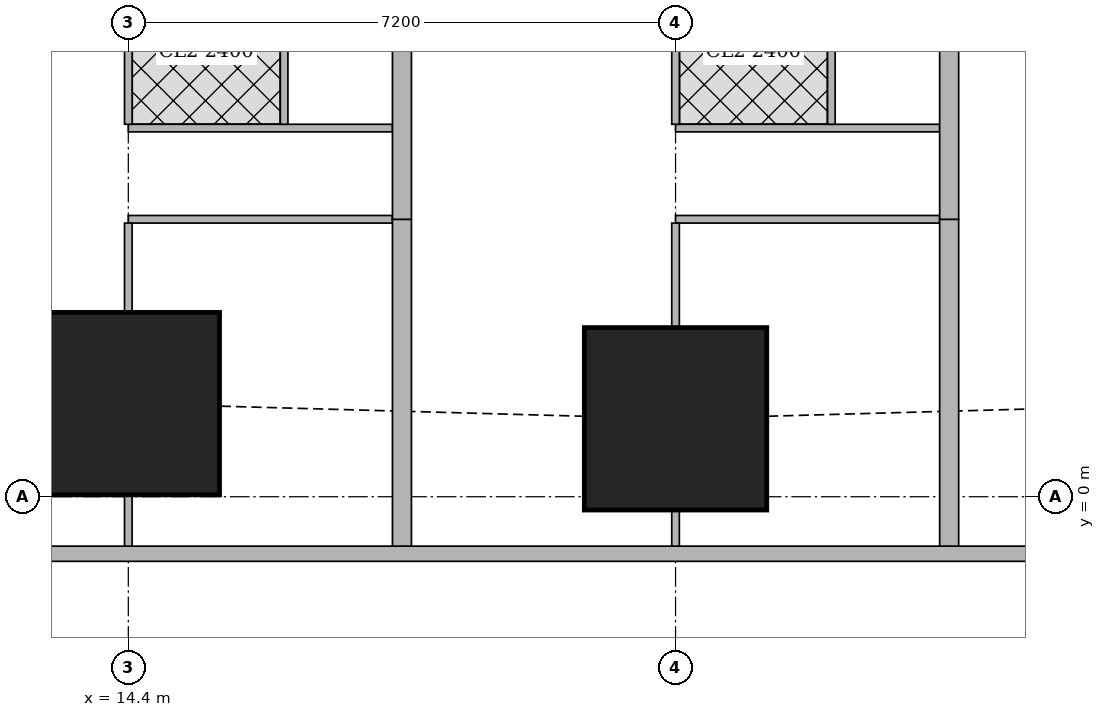
"""IFC4 building model, lengths in metres.
Left out: names, types, materials, properties, quantities, classifications, styles, units other than length and angle.
Written with IfcOpenShell. Run it as: python <this file> out.ifc"""

import sys

from ifc_helpers import new_model, si_unit, direction, frame, frame_2d, origin, origin_2d, place, context, subcontext, project, spatial, rectangle, extrude, element, fill, save


model = new_model("IFC4")
c1 = context("Model", 3, precision=1e-05, world=origin(), true_north=direction((0.0, 1.0)))
c2 = subcontext(c1, "Body", "Model", "MODEL_VIEW")
j1 = project(units=[si_unit("LENGTHUNIT", "METRE"), si_unit("PLANEANGLEUNIT", "RADIAN")], contexts=[c1])
p1 = place(None, origin())
s1 = spatial("IfcSite", under=j1, at=p1, CompositionType="ELEMENT")
p2 = place(p1, origin())
s2 = spatial("IfcBuilding", under=s1, at=p2, CompositionType="ELEMENT")
p3 = place(p2, frame((0.0, 0.0, 204.95)))
s3 = spatial("IfcBuildingStorey", under=s2, at=p3, CompositionType="ELEMENT", Elevation=204.95)
for number, where, z_axis, x_axis in (
    (1, (14.4, 1.225, 0.0), (0.0, 0.0, 1.0), (1.0, 0.0, 0.0)),
    (2, (21.6, 1.025, 0.0), (0.0, 0.0, 1.0), (1.0, 0.0, 0.0)),
):
    element("IfcColumn", number, at=place(p3, frame(where, z_axis=z_axis, x_axis=x_axis)), inside=s3, PredefinedType="COLUMN", context=c2, shape_type="SweptSolid", body=[
        extrude(rectangle(XDim=2.4, YDim=2.4, at=origin_2d()), origin(), (0.0, 0.0, 1.0), 3.75),
    ])
p4 = place(p3, frame((7.363, -0.75, 0.0), z_axis=(0.0, 0.0, 1.0), x_axis=(1.0, 0.0, 0.0)))
e3 = element("IfcWall", 3, at=p4, inside=s3, PredefinedType="SOLIDWALL", context=c2, shape_type="SweptSolid", body=[
    extrude(rectangle(XDim=40.428, YDim=0.2, at=frame_2d((20.214, 0.0))), origin(), (0.0, 0.0, 1.0), 3.5),
])
p5 = place(p4, frame((2.319, 0.0, 0.9)))
e4 = element("IfcOpeningElement", 4, at=p5, cuts=e3, PredefinedType="OPENING", context=c2, shape_type="SweptSolid", body=[
    extrude(rectangle(XDim=2.4, YDim=1.5, at=frame_2d((1.2, 0.75))), frame((0.0, 0.11, 0.0), z_axis=(0.0, -1.0, 0.0), x_axis=(1.0, 0.0, 0.0)), (0.0, 0.0, 1.0), 0.22),
])
p6 = place(p4, frame((7.937, 0.0, 0.9)))
e5 = element("IfcOpeningElement", 5, at=p6, cuts=e3, PredefinedType="OPENING", context=c2, shape_type="SweptSolid", body=[
    extrude(rectangle(XDim=1.8, YDim=1.5, at=frame_2d((0.9, 0.75))), frame((0.0, 0.11, 0.0), z_axis=(0.0, -1.0, 0.0), x_axis=(1.0, 0.0, 0.0)), (0.0, 0.0, 1.0), 0.22),
])
p7 = place(p4, frame((11.537, 0.0, 0.9)))
e6 = element("IfcOpeningElement", 6, at=p7, cuts=e3, PredefinedType="OPENING", context=c2, shape_type="SweptSolid", body=[
    extrude(rectangle(XDim=1.8, YDim=1.5, at=frame_2d((0.9, 0.75))), frame((0.0, 0.11, 0.0), z_axis=(0.0, -1.0, 0.0), x_axis=(1.0, 0.0, 0.0)), (0.0, 0.0, 1.0), 0.22),
])
p8 = place(p4, frame((15.137, 0.0, 0.9)))
e7 = element("IfcOpeningElement", 7, at=p8, cuts=e3, PredefinedType="OPENING", context=c2, shape_type="SweptSolid", body=[
    extrude(rectangle(XDim=1.8, YDim=1.5, at=frame_2d((0.9, 0.75))), frame((0.0, 0.11, 0.0), z_axis=(0.0, -1.0, 0.0), x_axis=(1.0, 0.0, 0.0)), (0.0, 0.0, 1.0), 0.22),
])
p9 = place(p4, frame((18.737, 0.0, 0.9)))
e8 = element("IfcOpeningElement", 8, at=p9, cuts=e3, PredefinedType="OPENING", context=c2, shape_type="SweptSolid", body=[
    extrude(rectangle(XDim=1.8, YDim=1.5, at=frame_2d((0.9, 0.75))), frame((0.0, 0.11, 0.0), z_axis=(0.0, -1.0, 0.0), x_axis=(1.0, 0.0, 0.0)), (0.0, 0.0, 1.0), 0.22),
])
p10 = place(p4, frame((22.337, 0.0, 0.9)))
e9 = element("IfcOpeningElement", 9, at=p10, cuts=e3, PredefinedType="OPENING", context=c2, shape_type="SweptSolid", body=[
    extrude(rectangle(XDim=1.8, YDim=1.5, at=frame_2d((0.9, 0.75))), frame((0.0, 0.11, 0.0), z_axis=(0.0, -1.0, 0.0), x_axis=(1.0, 0.0, 0.0)), (0.0, 0.0, 1.0), 0.22),
])
p11 = place(p4, frame((25.937, 0.0, 0.9)))
e10 = element("IfcOpeningElement", 10, at=p11, cuts=e3, PredefinedType="OPENING", context=c2, shape_type="SweptSolid", body=[
    extrude(rectangle(XDim=1.8, YDim=1.5, at=frame_2d((0.9, 0.75))), frame((0.0, 0.11, 0.0), z_axis=(0.0, -1.0, 0.0), x_axis=(1.0, 0.0, 0.0)), (0.0, 0.0, 1.0), 0.22),
])
p12 = place(p4, frame((29.537, 0.0, 0.9)))
e11 = element("IfcOpeningElement", 11, at=p12, cuts=e3, PredefinedType="OPENING", context=c2, shape_type="SweptSolid", body=[
    extrude(rectangle(XDim=1.8, YDim=1.5, at=frame_2d((0.9, 0.75))), frame((0.0, 0.11, 0.0), z_axis=(0.0, -1.0, 0.0), x_axis=(1.0, 0.0, 0.0)), (0.0, 0.0, 1.0), 0.22),
])
p13 = place(p3, frame((17.875, 3.65, 0.0), z_axis=(0.0, 0.0, 1.0), x_axis=(-1.0, 0.0, 0.0)))
e12 = element("IfcWall", 12, at=p13, inside=s3, PredefinedType="PARTITIONING", context=c2, shape_type="SweptSolid", body=[
    extrude(rectangle(XDim=3.475, YDim=0.1, at=frame_2d((1.738, 0.0))), origin(), (0.0, 0.0, 1.0), 3.5),
])
p14 = place(p13, frame((1.35, 0.0, 0.0)))
e13 = element("IfcOpeningElement", 13, at=p14, cuts=e12, PredefinedType="OPENING", context=c2, shape_type="SweptSolid", body=[
    extrude(rectangle(XDim=0.9, YDim=2.1, at=frame_2d((0.45, 1.05))), frame((0.0, 0.06, 0.0), z_axis=(0.0, -1.0, 0.0), x_axis=(1.0, 0.0, 0.0)), (0.0, 0.0, 1.0), 0.12),
])
p15 = place(p3, frame((17.875, 4.85, 0.0), z_axis=(0.0, 0.0, 1.0), x_axis=(-1.0, 0.0, 0.0)))
e14 = element("IfcWall", 14, at=p15, inside=s3, PredefinedType="PARTITIONING", context=c2, shape_type="SweptSolid", body=[
    extrude(rectangle(XDim=3.475, YDim=0.1, at=frame_2d((1.738, 0.0))), origin(), (0.0, 0.0, 1.0), 3.5),
])
p16 = place(p15, frame((2.0, 0.0, 0.0)))
e15 = element("IfcOpeningElement", 15, at=p16, cuts=e14, PredefinedType="OPENING", context=c2, shape_type="SweptSolid", body=[
    extrude(rectangle(XDim=0.9, YDim=2.1, at=frame_2d((0.45, 1.05))), frame((0.0, 0.06, 0.0), z_axis=(0.0, -1.0, 0.0), x_axis=(1.0, 0.0, 0.0)), (0.0, 0.0, 1.0), 0.12),
])
p17 = place(p15, frame((0.2, 0.0, 0.0)))
e16 = element("IfcOpeningElement", 16, at=p17, cuts=e14, PredefinedType="OPENING", context=c2, shape_type="SweptSolid", body=[
    extrude(rectangle(XDim=0.9, YDim=2.1, at=frame_2d((0.45, 1.05))), frame((0.0, 0.06, 0.0), z_axis=(0.0, -1.0, 0.0), x_axis=(1.0, 0.0, 0.0)), (0.0, 0.0, 1.0), 0.12),
])
p18 = place(p3, frame((14.4, -0.65, 0.0), z_axis=(0.0, 0.0, 1.0), x_axis=(0.0, 1.0, 0.0)))
e17 = element("IfcWall", 17, at=p18, inside=s3, PredefinedType="PARTITIONING", context=c2, shape_type="SweptSolid", body=[
    extrude(rectangle(XDim=0.674, YDim=0.1, at=frame_2d((0.337, 0.0))), origin(), (0.0, 0.0, 1.0), 3.5),
])
p19 = place(p3, frame((14.4, 2.426, 0.0), z_axis=(0.0, 0.0, 1.0), x_axis=(0.0, 1.0, 0.0)))
e18 = element("IfcWall", 18, at=p19, inside=s3, PredefinedType="PARTITIONING", context=c2, shape_type="SweptSolid", body=[
    extrude(rectangle(XDim=1.174, YDim=0.1, at=frame_2d((0.587, 0.0))), origin(), (0.0, 0.0, 1.0), 3.5),
])
p20 = place(p3, frame((14.4, 4.9, 0.0), z_axis=(0.0, 0.0, 1.0), x_axis=(0.0, 1.0, 0.0)))
e19 = element("IfcWall", 19, at=p20, inside=s3, PredefinedType="PARTITIONING", context=c2, shape_type="SweptSolid", body=[
    extrude(rectangle(XDim=1.899, YDim=0.1, at=frame_2d((0.95, 0.0))), origin(), (0.0, 0.0, 1.0), 3.5),
])
p21 = place(p3, frame((16.45, 4.9, 0.0), z_axis=(0.0, 0.0, 1.0), x_axis=(0.0, 1.0, 0.0)))
e20 = element("IfcWall", 20, at=p21, inside=s3, PredefinedType="PARTITIONING", context=c2, shape_type="SweptSolid", body=[
    extrude(rectangle(XDim=3.525, YDim=0.1, at=frame_2d((1.763, 0.0))), origin(), (0.0, 0.0, 1.0), 3.5),
])
p22 = place(p3, frame((25.075, 3.65, 0.0), z_axis=(0.0, 0.0, 1.0), x_axis=(-1.0, 0.0, 0.0)))
e21 = element("IfcWall", 21, at=p22, inside=s3, PredefinedType="PARTITIONING", context=c2, shape_type="SweptSolid", body=[
    extrude(rectangle(XDim=3.475, YDim=0.1, at=frame_2d((1.737, 0.0))), origin(), (0.0, 0.0, 1.0), 3.5),
])
p23 = place(p22, frame((2.375, 0.0, 0.0)))
e22 = element("IfcOpeningElement", 22, at=p23, cuts=e21, PredefinedType="OPENING", context=c2, shape_type="SweptSolid", body=[
    extrude(rectangle(XDim=0.9, YDim=2.1, at=frame_2d((0.45, 1.05))), frame((0.0, 0.06, 0.0), z_axis=(0.0, -1.0, 0.0), x_axis=(1.0, 0.0, 0.0)), (0.0, 0.0, 1.0), 0.12),
])
p24 = place(p3, frame((25.075, 4.85, 0.0), z_axis=(0.0, 0.0, 1.0), x_axis=(-1.0, 0.0, 0.0)))
e23 = element("IfcWall", 23, at=p24, inside=s3, PredefinedType="PARTITIONING", context=c2, shape_type="SweptSolid", body=[
    extrude(rectangle(XDim=3.475, YDim=0.1, at=frame_2d((1.737, 0.0))), origin(), (0.0, 0.0, 1.0), 3.5),
])
p25 = place(p24, frame((2.0, 0.0, 0.0)))
e24 = element("IfcOpeningElement", 24, at=p25, cuts=e23, PredefinedType="OPENING", context=c2, shape_type="SweptSolid", body=[
    extrude(rectangle(XDim=0.9, YDim=2.1, at=frame_2d((0.45, 1.05))), frame((0.0, 0.06, 0.0), z_axis=(0.0, -1.0, 0.0), x_axis=(1.0, 0.0, 0.0)), (0.0, 0.0, 1.0), 0.12),
])
p26 = place(p24, frame((0.2, 0.0, 0.0)))
e25 = element("IfcOpeningElement", 25, at=p26, cuts=e23, PredefinedType="OPENING", context=c2, shape_type="SweptSolid", body=[
    extrude(rectangle(XDim=0.9, YDim=2.1, at=frame_2d((0.45, 1.05))), frame((0.0, 0.06, 0.0), z_axis=(0.0, -1.0, 0.0), x_axis=(1.0, 0.0, 0.0)), (0.0, 0.0, 1.0), 0.12),
])
p27 = place(p3, frame((21.6, -0.65, 0.0), z_axis=(0.0, 0.0, 1.0), x_axis=(0.0, 1.0, 0.0)))
e26 = element("IfcWall", 26, at=p27, inside=s3, PredefinedType="PARTITIONING", context=c2, shape_type="SweptSolid", body=[
    extrude(rectangle(XDim=0.474, YDim=0.1, at=frame_2d((0.237, 0.0))), origin(), (0.0, 0.0, 1.0), 3.5),
])
p28 = place(p3, frame((21.6, 2.226, 0.0), z_axis=(0.0, 0.0, 1.0), x_axis=(0.0, 1.0, 0.0)))
e27 = element("IfcWall", 27, at=p28, inside=s3, PredefinedType="PARTITIONING", context=c2, shape_type="SweptSolid", body=[
    extrude(rectangle(XDim=1.374, YDim=0.1, at=frame_2d((0.687, 0.0))), origin(), (0.0, 0.0, 1.0), 3.5),
])
p29 = place(p3, frame((21.6, 4.9, 0.0), z_axis=(0.0, 0.0, 1.0), x_axis=(0.0, 1.0, 0.0)))
e28 = element("IfcWall", 28, at=p29, inside=s3, PredefinedType="PARTITIONING", context=c2, shape_type="SweptSolid", body=[
    extrude(rectangle(XDim=1.899, YDim=0.1, at=frame_2d((0.95, 0.0))), origin(), (0.0, 0.0, 1.0), 3.5),
])
p30 = place(p3, frame((23.65, 4.9, 0.0), z_axis=(0.0, 0.0, 1.0), x_axis=(0.0, 1.0, 0.0)))
e29 = element("IfcWall", 29, at=p30, inside=s3, PredefinedType="PARTITIONING", context=c2, shape_type="SweptSolid", body=[
    extrude(rectangle(XDim=3.525, YDim=0.1, at=frame_2d((1.763, 0.0))), origin(), (0.0, 0.0, 1.0), 3.5),
])
p31 = place(p3, frame((18.0, -0.65, 0.0), z_axis=(0.0, 0.0, 1.0), x_axis=(0.0, 1.0, 0.0)))
e30 = element("IfcWall", 30, at=p31, inside=s3, PredefinedType="SOLIDWALL", context=c2, shape_type="SweptSolid", body=[
    extrude(rectangle(XDim=4.3, YDim=0.25, at=frame_2d((2.15, 0.0))), origin(), (0.0, 0.0, 1.0), 2.05),
])
p32 = place(p3, frame((18.0, 3.65, 0.0), z_axis=(0.0, 0.0, 1.0), x_axis=(0.0, 1.0, 0.0)))
e31 = element("IfcWall", 31, at=p32, inside=s3, PredefinedType="SOLIDWALL", context=c2, shape_type="SweptSolid", body=[
    extrude(rectangle(XDim=4.775, YDim=0.25, at=frame_2d((2.388, 0.0))), origin(), (0.0, 0.0, 1.0), 3.5),
])
p33 = place(p3, frame((25.2, -0.65, 0.0), z_axis=(0.0, 0.0, 1.0), x_axis=(0.0, 1.0, 0.0)))
e32 = element("IfcWall", 32, at=p33, inside=s3, PredefinedType="SOLIDWALL", context=c2, shape_type="SweptSolid", body=[
    extrude(rectangle(XDim=4.3, YDim=0.25, at=frame_2d((2.15, 0.0))), origin(), (0.0, 0.0, 1.0), 2.05),
])
p34 = place(p3, frame((25.2, 3.65, 0.0), z_axis=(0.0, 0.0, 1.0), x_axis=(0.0, 1.0, 0.0)))
e33 = element("IfcWall", 33, at=p34, inside=s3, PredefinedType="SOLIDWALL", context=c2, shape_type="SweptSolid", body=[
    extrude(rectangle(XDim=4.775, YDim=0.25, at=frame_2d((2.388, 0.0))), origin(), (0.0, 0.0, 1.0), 3.5),
])
p35 = place(p6, origin())
e34 = element("IfcWindow", 34, at=p35, inside=s3, PartitioningType="SINGLE_PANEL", PredefinedType="WINDOW", context=c2, shape_type="SweptSolid", body=[
    extrude(rectangle(XDim=1.8, YDim=1.5, at=frame_2d((0.9, 0.75))), frame((0.0, 0.03, 0.0), z_axis=(0.0, -1.0, 0.0), x_axis=(1.0, 0.0, 0.0)), (0.0, 0.0, 1.0), 0.06),
])
fill(e5, e34)
p36 = place(p7, origin())
e35 = element("IfcWindow", 35, at=p36, inside=s3, PartitioningType="SINGLE_PANEL", PredefinedType="WINDOW", context=c2, shape_type="SweptSolid", body=[
    extrude(rectangle(XDim=1.8, YDim=1.5, at=frame_2d((0.9, 0.75))), frame((0.0, 0.03, 0.0), z_axis=(0.0, -1.0, 0.0), x_axis=(1.0, 0.0, 0.0)), (0.0, 0.0, 1.0), 0.06),
])
fill(e6, e35)
p37 = place(p8, origin())
e36 = element("IfcWindow", 36, at=p37, inside=s3, PartitioningType="SINGLE_PANEL", PredefinedType="WINDOW", context=c2, shape_type="SweptSolid", body=[
    extrude(rectangle(XDim=1.8, YDim=1.5, at=frame_2d((0.9, 0.75))), frame((0.0, 0.03, 0.0), z_axis=(0.0, -1.0, 0.0), x_axis=(1.0, 0.0, 0.0)), (0.0, 0.0, 1.0), 0.06),
])
fill(e7, e36)
p38 = place(p9, origin())
e37 = element("IfcWindow", 37, at=p38, inside=s3, PartitioningType="SINGLE_PANEL", PredefinedType="WINDOW", context=c2, shape_type="SweptSolid", body=[
    extrude(rectangle(XDim=1.8, YDim=1.5, at=frame_2d((0.9, 0.75))), frame((0.0, 0.03, 0.0), z_axis=(0.0, -1.0, 0.0), x_axis=(1.0, 0.0, 0.0)), (0.0, 0.0, 1.0), 0.06),
])
fill(e8, e37)
p39 = place(p14, origin())
e38 = element("IfcDoor", 38, at=p39, inside=s3, OperationType="SINGLE_SWING_RIGHT", PredefinedType="DOOR", context=c2, shape_type="SweptSolid", body=[
    extrude(rectangle(XDim=0.9, YDim=2.1, at=frame_2d((0.45, 1.05))), frame((0.0, 0.025, 0.0), z_axis=(0.0, -1.0, 0.0), x_axis=(1.0, 0.0, 0.0)), (0.0, 0.0, 1.0), 0.05),
])
fill(e13, e38)
p40 = place(p16, origin())
e39 = element("IfcDoor", 39, at=p40, inside=s3, OperationType="SINGLE_SWING_LEFT", PredefinedType="DOOR", context=c2, shape_type="SweptSolid", body=[
    extrude(rectangle(XDim=0.9, YDim=2.1, at=frame_2d((0.45, 1.05))), frame((0.0, 0.025, 0.0), z_axis=(0.0, -1.0, 0.0), x_axis=(1.0, 0.0, 0.0)), (0.0, 0.0, 1.0), 0.05),
])
fill(e15, e39)
p41 = place(p17, origin())
e40 = element("IfcDoor", 40, at=p41, inside=s3, OperationType="SINGLE_SWING_RIGHT", PredefinedType="DOOR", context=c2, shape_type="SweptSolid", body=[
    extrude(rectangle(XDim=0.9, YDim=2.1, at=frame_2d((0.45, 1.05))), frame((0.0, 0.025, 0.0), z_axis=(0.0, -1.0, 0.0), x_axis=(1.0, 0.0, 0.0)), (0.0, 0.0, 1.0), 0.05),
])
fill(e16, e40)
p42 = place(p23, origin())
e41 = element("IfcDoor", 41, at=p42, inside=s3, OperationType="SINGLE_SWING_RIGHT", PredefinedType="DOOR", context=c2, shape_type="SweptSolid", body=[
    extrude(rectangle(XDim=0.9, YDim=2.1, at=frame_2d((0.45, 1.05))), frame((0.0, 0.025, 0.0), z_axis=(0.0, -1.0, 0.0), x_axis=(1.0, 0.0, 0.0)), (0.0, 0.0, 1.0), 0.05),
])
fill(e22, e41)
p43 = place(p25, origin())
e42 = element("IfcDoor", 42, at=p43, inside=s3, OperationType="SINGLE_SWING_LEFT", PredefinedType="DOOR", context=c2, shape_type="SweptSolid", body=[
    extrude(rectangle(XDim=0.9, YDim=2.1, at=frame_2d((0.45, 1.05))), frame((0.0, 0.025, 0.0), z_axis=(0.0, -1.0, 0.0), x_axis=(1.0, 0.0, 0.0)), (0.0, 0.0, 1.0), 0.05),
])
fill(e24, e42)
p44 = place(p26, origin())
e43 = element("IfcDoor", 43, at=p44, inside=s3, OperationType="SINGLE_SWING_RIGHT", PredefinedType="DOOR", context=c2, shape_type="SweptSolid", body=[
    extrude(rectangle(XDim=0.9, YDim=2.1, at=frame_2d((0.45, 1.05))), frame((0.0, 0.025, 0.0), z_axis=(0.0, -1.0, 0.0), x_axis=(1.0, 0.0, 0.0)), (0.0, 0.0, 1.0), 0.05),
])
fill(e25, e43)
save(model, sys.argv[1])
